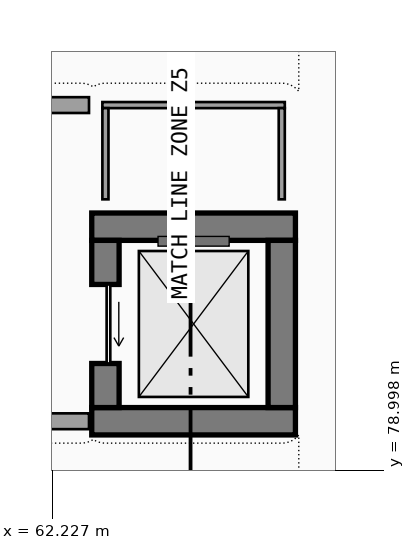
"""IFC4 building model, lengths in metres.
Left out: names, types, materials, properties, quantities, classifications, styles, units other than length and angle.
Written with IfcOpenShell. Run it as: python <this file> out.ifc"""

import sys

from ifc_helpers import new_model, si_unit, direction, frame, frame_2d, origin, place, context, subcontext, project, spatial, rectangle, extrude, element, fill, save


model = new_model("IFC4")
c1 = context("Model", 3, precision=1e-05, world=origin(), true_north=direction((0.0, 1.0)))
c2 = subcontext(c1, "Body", "Model", "MODEL_VIEW")
j1 = project(units=[si_unit("LENGTHUNIT", "METRE"), si_unit("PLANEANGLEUNIT", "RADIAN")], contexts=[c1])
p1 = place(None, origin())
s1 = spatial("IfcSite", under=j1, at=p1, CompositionType="ELEMENT")
p2 = place(p1, origin())
s2 = spatial("IfcBuilding", under=s1, at=p2, CompositionType="ELEMENT")
p3 = place(p2, frame((0.0, 0.0, -4.8)))
s3 = spatial("IfcBuildingStorey", under=s2, at=p3, CompositionType="ELEMENT", Elevation=-4.8)
for number, where, z_axis, x_axis in (
    (1, (62.875, 79.8, 0.0), (0.0, 0.0, 1.0), (1.0, 0.0, 0.0)),
    (2, (66.225, 83.0, 0.0), (0.0, 0.0, 1.0), (-1.0, 0.0, 0.0)),
):
    element("IfcWall", number, at=place(p3, frame(where, z_axis=z_axis, x_axis=x_axis)), inside=s3, PredefinedType="SHEAR", context=c2, shape_type="SweptSolid", body=[
        extrude(rectangle(XDim=3.35, YDim=0.45, at=frame_2d((1.675, 0.0))), origin(), (0.0, 0.0, 1.0), 4.5),
    ])
p4 = place(p3, frame((63.1, 82.775, 0.0), z_axis=(0.0, 0.0, 1.0), x_axis=(0.0, -1.0, 0.0)))
e3 = element("IfcWall", 3, at=p4, inside=s3, PredefinedType="SHEAR", context=c2, shape_type="SweptSolid", body=[
    extrude(rectangle(XDim=2.75, YDim=0.45, at=frame_2d((1.375, 0.0))), origin(), (0.0, 0.0, 1.0), 4.5),
])
p5 = place(p4, frame((0.725, 0.0, 0.0), z_axis=(0.0, 0.0, 1.0), x_axis=(1.0, 0.0, 0.0)))
e4 = element("IfcOpeningElement", 4, at=p5, cuts=e3, PredefinedType="OPENING", context=c2, shape_type="SweptSolid", body=[
    extrude(rectangle(XDim=1.3, YDim=2.25, at=frame_2d((0.65, 1.125))), frame((0.0, 0.235, 0.0), z_axis=(0.0, -1.0, 0.0), x_axis=(1.0, 0.0, 0.0)), (0.0, 0.0, 1.0), 0.47),
])
p6 = place(p3, frame((66.0, 80.025, 0.0), z_axis=(0.0, 0.0, 1.0), x_axis=(0.0, 1.0, 0.0)))
e5 = element("IfcWall", 5, at=p6, inside=s3, PredefinedType="SHEAR", context=c2, shape_type="SweptSolid", body=[
    extrude(rectangle(XDim=2.75, YDim=0.45, at=frame_2d((1.375, 0.0))), origin(), (0.0, 0.0, 1.0), 4.5),
])
p7 = place(p3, frame((66.05, 85.0, 0.0), z_axis=(0.0, 0.0, 1.0), x_axis=(-1.0, 0.0, 0.0)))
e6 = element("IfcWall", 6, at=p7, inside=s3, PredefinedType="PARTITIONING", context=c2, shape_type="SweptSolid", body=[
    extrude(rectangle(XDim=3.0, YDim=0.1, at=frame_2d((1.5, 0.0))), origin(), (0.0, 0.0, 1.0), 4.5),
])
for number, where, z_axis, x_axis in (
    (7, (63.1, 84.95, 0.0), (0.0, 0.0, 1.0), (0.0, -1.0, 0.0)),
    (8, (66.0, 83.45, 0.0), (0.0, 0.0, 1.0), (0.0, 1.0, 0.0)),
):
    element("IfcWall", number, at=place(p3, frame(where, z_axis=z_axis, x_axis=x_axis)), inside=s3, PredefinedType="PARTITIONING", context=c2, shape_type="SweptSolid", body=[
        extrude(rectangle(XDim=1.5, YDim=0.1, at=frame_2d((0.75, 0.0))), origin(), (0.0, 0.0, 1.0), 4.5),
    ])
p8 = place(p3, frame((59.07, 79.8, 0.0), z_axis=(0.0, 0.0, 1.0), x_axis=(1.0, 0.0, 0.0)))
e9 = element("IfcWall", 9, at=p8, inside=s3, PredefinedType="SOLIDWALL", context=c2, shape_type="SweptSolid", body=[
    extrude(rectangle(XDim=3.76, YDim=0.26, at=frame_2d((1.88, 0.0))), origin(), (0.0, 0.0, 1.0), 4.5),
])
p9 = place(p3, frame((62.83, 85.0, 0.0), z_axis=(0.0, 0.0, 1.0), x_axis=(-1.0, 0.0, 0.0)))
e10 = element("IfcWall", 10, at=p9, inside=s3, PredefinedType="SOLIDWALL", context=c2, shape_type="SweptSolid", body=[
    extrude(rectangle(XDim=3.76, YDim=0.26, at=frame_2d((1.88, 0.0))), origin(), (0.0, 0.0, 1.0), 4.5),
])
p10 = place(p9, frame((2.805, 0.0, 0.0), z_axis=(0.0, 0.0, 1.0), x_axis=(-1.0, 0.0, 0.0)))
e11 = element("IfcOpeningElement", 11, at=p10, cuts=e10, PredefinedType="OPENING", context=c2, shape_type="SweptSolid", body=[
    extrude(rectangle(XDim=1.85, YDim=2.25, at=frame_2d((0.925, 1.125))), frame((0.0, 0.14, 0.0), z_axis=(0.0, -1.0, 0.0), x_axis=(1.0, 0.0, 0.0)), (0.0, 0.0, 1.0), 0.28),
])
p11 = place(p5, origin())
e12 = element("IfcDoor", 12, at=p11, inside=s3, OperationType="SLIDING_TO_RIGHT", PredefinedType="DOOR", context=c2, shape_type="SweptSolid", body=[
    extrude(rectangle(XDim=1.3, YDim=2.25, at=frame_2d((0.65, 1.125))), frame((0.0, 0.025, 0.0), z_axis=(0.0, -1.0, 0.0), x_axis=(1.0, 0.0, 0.0)), (0.0, 0.0, 1.0), 0.05),
])
fill(e4, e12)
save(model, sys.argv[1])
